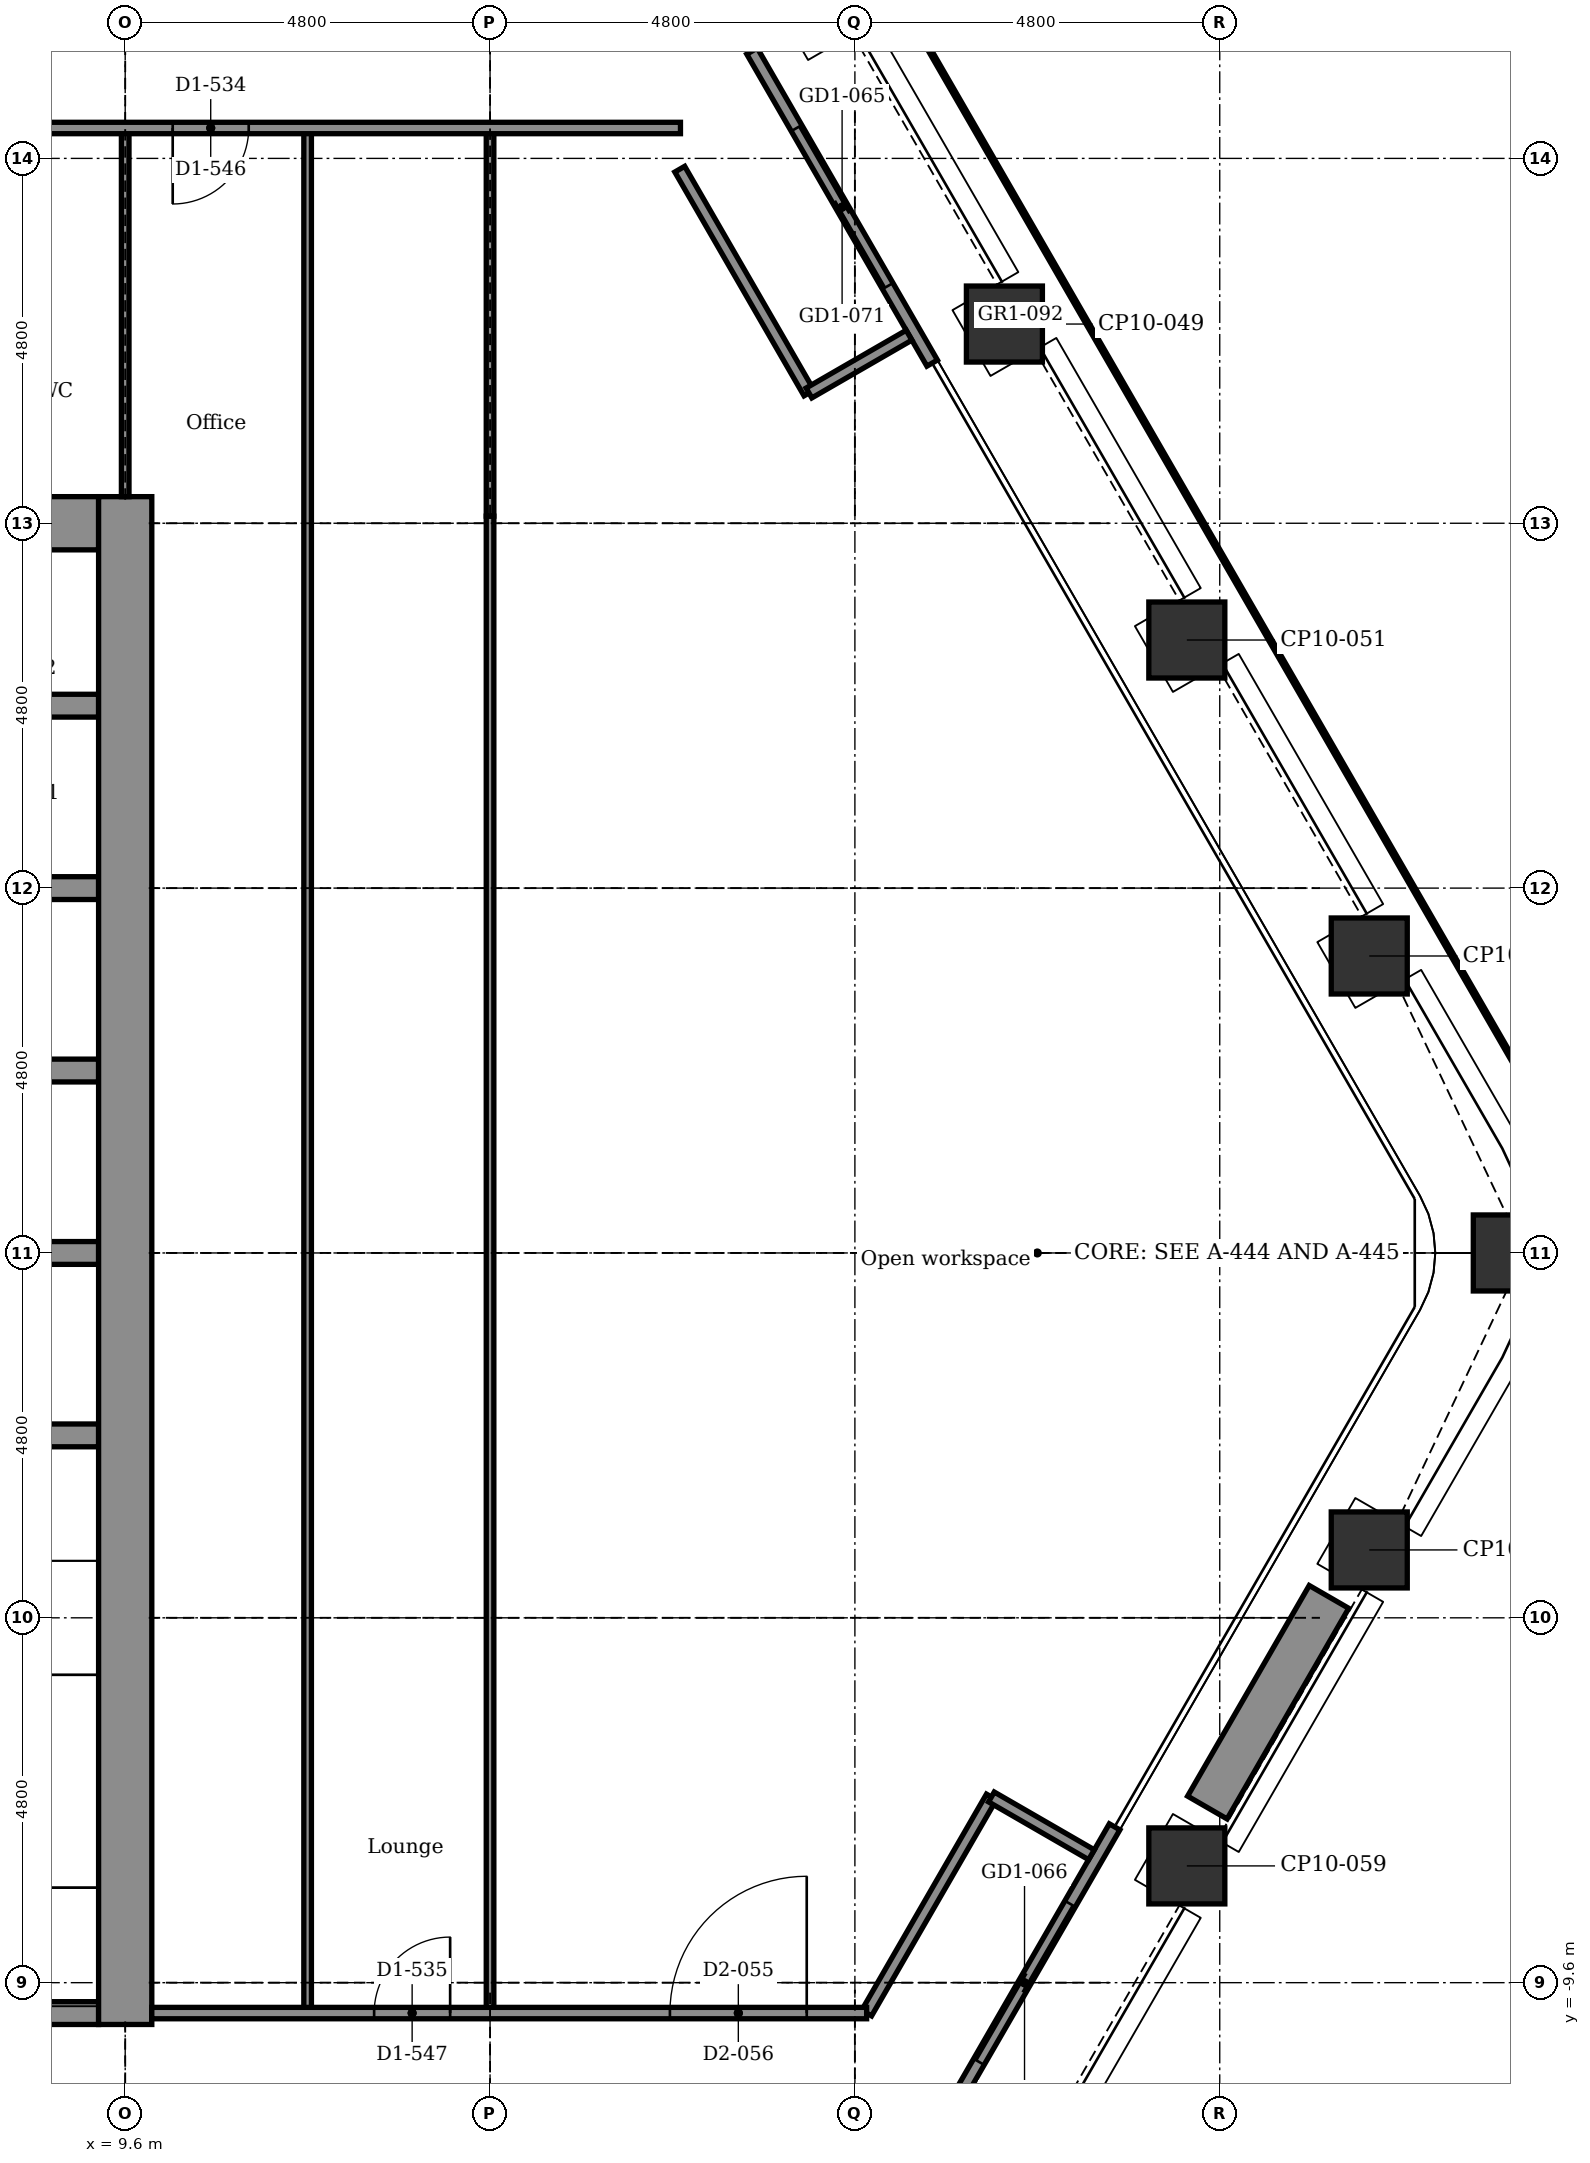
"""IFC4 building model, lengths in metres.
Left out: names, types, materials, properties, quantities, classifications, styles, units other than length and angle.
Written with IfcOpenShell. Run it as: python <this file> out.ifc"""

import sys

from ifc_helpers import new_model, si_unit, direction, frame, frame_2d, origin, origin_2d, place, context, subcontext, project, spatial, rectangle, extrude, element, fill, save


model = new_model("IFC4")
c1 = context("Model", 3, precision=1e-05, world=origin(), true_north=direction((0.0, 1.0)))
c2 = subcontext(c1, "Body", "Model", "MODEL_VIEW")
j1 = project(units=[si_unit("LENGTHUNIT", "METRE"), si_unit("PLANEANGLEUNIT", "RADIAN")], contexts=[c1])
p1 = place(None, origin())
s1 = spatial("IfcSite", under=j1, at=p1, CompositionType="ELEMENT")
p2 = place(p1, origin())
s2 = spatial("IfcBuilding", under=s1, at=p2, CompositionType="ELEMENT")
p3 = place(p2, frame((0.0, 0.0, 185.6)))
s3 = spatial("IfcBuildingStorey", under=s2, at=p3, CompositionType="ELEMENT", Elevation=185.6)
for number, where, z_axis, x_axis in (
    (1, (18.767, 16.378, -0.15), (0.0, 0.0, 1.0), (0.866, 0.5, 0.0)),
    (2, (21.167, 12.221, -0.15), (0.0, 0.0, 1.0), (0.866, 0.5, 0.0)),
    (3, (23.567, 8.064, -0.15), (0.0, 0.0, 1.0), (0.866, 0.5, 0.0)),
    (4, (25.967, 3.907, -0.15), (0.0, 0.0, 1.0), (0.866, 0.5, 0.0)),
    (5, (27.836, 0.0, -0.15), (0.0, 0.0, 1.0), (1.0, 0.0, 0.0)),
    (6, (25.967, -3.907, -0.15), (0.0, 0.0, 1.0), (0.5, 0.866, 0.0)),
    (7, (23.567, -8.064, -0.15), (0.0, 0.0, 1.0), (0.5, 0.866, 0.0)),
):
    element("IfcColumn", number, at=place(p3, frame(where, z_axis=z_axis, x_axis=x_axis)), inside=s3, PredefinedType="COLUMN", context=c2, shape_type="SweptSolid", body=[
        extrude(rectangle(XDim=1.0, YDim=1.0, at=origin_2d()), origin(), (0.0, 0.0, 1.0), 3.9),
    ])
p4 = place(p3, frame((4.95, -10.0, -0.15), z_axis=(0.0, 0.0, 1.0), x_axis=(1.0, 0.0, 0.0)))
e8 = element("IfcWall", 8, at=p4, inside=s3, PredefinedType="STANDARD", context=c2, shape_type="SweptSolid", body=[
    extrude(rectangle(XDim=4.3, YDim=0.3, at=frame_2d((2.15, 0.0))), origin(), (0.0, 0.0, 1.0), 3.9),
])
for number, where, z_axis, x_axis in (
    (9, (6.15, -2.4, -0.15), (0.0, 0.0, 1.0), (1.0, 0.0, 0.0)),
    (10, (6.15, 0.0, -0.15), (0.0, 0.0, 1.0), (1.0, 0.0, 0.0)),
    (11, (6.15, 2.4, -0.15), (0.0, 0.0, 1.0), (1.0, 0.0, 0.0)),
    (12, (6.15, 4.8, -0.15), (0.0, 0.0, 1.0), (1.0, 0.0, 0.0)),
):
    element("IfcWall", number, at=place(p3, frame(where, z_axis=z_axis, x_axis=x_axis)), inside=s3, PredefinedType="STANDARD", context=c2, shape_type="SweptSolid", body=[
        extrude(rectangle(XDim=3.1, YDim=0.3, at=frame_2d((1.55, 0.0))), origin(), (0.0, 0.0, 1.0), 3.9),
    ])
p5 = place(p3, frame((6.0, 7.2, -0.15), z_axis=(0.0, 0.0, 1.0), x_axis=(1.0, 0.0, 0.0)))
e13 = element("IfcWall", 13, at=p5, inside=s3, PredefinedType="STANDARD", context=c2, shape_type="SweptSolid", body=[
    extrude(rectangle(XDim=3.25, YDim=0.3, at=frame_2d((1.625, 0.0))), origin(), (0.0, 0.0, 1.0), 3.9),
])
p6 = place(p3, frame((-5.25, 9.6, -0.15), z_axis=(0.0, 0.0, 1.0), x_axis=(1.0, 0.0, 0.0)))
e14 = element("IfcWall", 14, at=p6, inside=s3, PredefinedType="SHEAR", context=c2, shape_type="SweptSolid", body=[
    extrude(rectangle(XDim=14.5, YDim=0.7, at=frame_2d((7.25, 0.0))), origin(), (0.0, 0.0, 1.0), 3.9),
])
p7 = place(p6, frame((9.35, 0.0, 0.15)))
e15 = element("IfcOpeningElement", 15, at=p7, cuts=e14, PredefinedType="OPENING", context=c2, shape_type="SweptSolid", body=[
    extrude(rectangle(XDim=1.4, YDim=2.1, at=frame_2d((0.7, 1.05))), frame((0.0, 0.36, 0.0), z_axis=(0.0, -1.0, 0.0), x_axis=(1.0, 0.0, 0.0)), (0.0, 0.0, 1.0), 0.72),
])
p8 = place(p3, frame((9.6, -10.15, -0.15), z_axis=(0.0, 0.0, 1.0), x_axis=(0.0, 1.0, 0.0)))
e16 = element("IfcWall", 16, at=p8, inside=s3, PredefinedType="SHEAR", context=c2, shape_type="SweptSolid", body=[
    extrude(rectangle(XDim=20.1, YDim=0.7, at=frame_2d((10.05, 0.0))), origin(), (0.0, 0.0, 1.0), 3.9),
])
p9 = place(p3, frame((17.847, 15.812, 0.0), z_axis=(0.0, 0.0, 1.0), x_axis=(0.5000167099, -0.866015756104, 0.0)))
e17 = element("IfcWall", 17, at=p9, inside=s3, PredefinedType="PARTITIONING", context=c2, shape_type="SweptSolid", body=[
    extrude(rectangle(XDim=4.74, YDim=0.16, at=frame_2d((2.37, 0.0))), origin(), (0.0, 0.0, 1.0), 3.75),
])
p10 = place(p9, frame((1.17, 0.0, 0.0)))
e18 = element("IfcOpeningElement", 18, at=p10, cuts=e17, PredefinedType="OPENING", context=c2, shape_type="SweptSolid", body=[
    extrude(rectangle(XDim=2.4, YDim=2.4, at=frame_2d((1.2, 1.2))), frame((0.0, 0.09, 0.0), z_axis=(0.0, -1.0, 0.0), x_axis=(1.0, 0.0, 0.0)), (0.0, 0.0, 1.0), 0.18),
])
p11 = place(p3, frame((22.617, -7.55, 0.0), z_axis=(0.0, 0.0, 1.0), x_axis=(-0.5000167099, -0.866015756104, 0.0)))
e19 = element("IfcWall", 19, at=p11, inside=s3, PredefinedType="PARTITIONING", context=c2, shape_type="SweptSolid", body=[
    extrude(rectangle(XDim=4.74, YDim=0.16, at=frame_2d((2.37, 0.0))), origin(), (0.0, 0.0, 1.0), 3.75),
])
p12 = place(p11, frame((1.17, 0.0, 0.0)))
e20 = element("IfcOpeningElement", 20, at=p12, cuts=e19, PredefinedType="OPENING", context=c2, shape_type="SweptSolid", body=[
    extrude(rectangle(XDim=2.4, YDim=2.4, at=frame_2d((1.2, 1.2))), frame((0.0, 0.09, 0.0), z_axis=(0.0, -1.0, 0.0), x_axis=(1.0, 0.0, 0.0)), (0.0, 0.0, 1.0), 0.18),
])
p13 = place(p3, frame((25.437, -4.525, 0.0), z_axis=(0.0, 0.0, 1.0), x_axis=(-0.499938187974, -0.866061088033, 0.0)))
e21 = element("IfcWall", 21, at=p13, inside=s3, PredefinedType="USERDEFINED", context=c2, shape_type="SweptSolid", body=[
    extrude(rectangle(XDim=3.2, YDim=0.6, at=frame_2d((1.6, 0.0))), origin(), (0.0, 0.0, 1.0), 0.7),
])
p14 = place(p3, frame((14.4, -10.0, 0.0), z_axis=(0.0, 0.0, 1.0), x_axis=(0.0, 1.0, 0.0)))
e22 = element("IfcWall", 22, at=p14, inside=s3, PredefinedType="PARTITIONING", context=c2, shape_type="SweptSolid", body=[
    extrude(rectangle(XDim=19.694, YDim=0.1, at=frame_2d((9.847, 0.0))), origin(), (0.0, 0.0, 1.0), 3.75),
])
p15 = place(p3, frame((14.4, 9.694, 0.0), z_axis=(0.0, 0.0, 1.0), x_axis=(0.0, 1.0, 0.0)))
e23 = element("IfcWall", 23, at=p15, inside=s3, PredefinedType="PARTITIONING", context=c2, shape_type="SweptSolid", body=[
    extrude(rectangle(XDim=5.106, YDim=0.1, at=frame_2d((2.553, 0.0))), origin(), (0.0, 0.0, 1.0), 3.066),
])
p16 = place(p3, frame((12.0, -10.0, 0.0), z_axis=(0.0, 0.0, 1.0), x_axis=(0.0, 1.0, 0.0)))
e24 = element("IfcWall", 24, at=p16, inside=s3, PredefinedType="PARTITIONING", context=c2, shape_type="SweptSolid", body=[
    extrude(rectangle(XDim=24.8, YDim=0.1, at=frame_2d((12.4, 0.0))), origin(), (0.0, 0.0, 1.0), 3.75),
])
p17 = place(p3, frame((9.6, 9.95, 0.0), z_axis=(0.0, 0.0, 1.0), x_axis=(0.0, 1.0, 0.0)))
e25 = element("IfcWall", 25, at=p17, inside=s3, PredefinedType="PARTITIONING", context=c2, shape_type="SweptSolid", body=[
    extrude(rectangle(XDim=4.85, YDim=0.1, at=frame_2d((2.425, 0.0))), origin(), (0.0, 0.0, 1.0), 3.066),
])
p18 = place(p3, frame((16.896, 14.258, 0.0), z_axis=(0.0, 0.0, 1.0), x_axis=(0.499977295307, -0.866038511948, 0.0)))
e26 = element("IfcWall", 26, at=p18, inside=s3, PredefinedType="PARTITIONING", context=c2, shape_type="SweptSolid", body=[
    extrude(rectangle(XDim=3.4, YDim=0.15, at=frame_2d((1.7, 0.0))), origin(), (0.0, 0.0, 1.0), 3.75),
])
p19 = place(p3, frame((19.354, -10.0, 0.0), z_axis=(0.0, 0.0, 1.0), x_axis=(0.500009969958, 0.86601964755, 0.0)))
e27 = element("IfcWall", 27, at=p19, inside=s3, PredefinedType="PARTITIONING", context=c2, shape_type="SweptSolid", body=[
    extrude(rectangle(XDim=3.283, YDim=0.15, at=frame_2d((1.642, 0.0))), origin(), (0.0, 0.0, 1.0), 3.75),
])
p20 = place(p3, frame((20.996, -7.157, 0.0), z_axis=(0.0, 0.0, 1.0), x_axis=(0.865960906633, -0.500111695708, 0.0)))
e28 = element("IfcWall", 28, at=p20, inside=s3, PredefinedType="PARTITIONING", context=c2, shape_type="SweptSolid", body=[
    extrude(rectangle(XDim=1.52, YDim=0.15, at=frame_2d((0.76, 0.0))), origin(), (0.0, 0.0, 1.0), 3.75),
])
p21 = place(p3, frame((18.596, 11.314, 0.0), z_axis=(0.0, 0.0, 1.0), x_axis=(0.866030456496, 0.499991248344, 0.0)))
e29 = element("IfcWall", 29, at=p21, inside=s3, PredefinedType="PARTITIONING", context=c2, shape_type="SweptSolid", body=[
    extrude(rectangle(XDim=1.52, YDim=0.15, at=frame_2d((0.76, 0.0))), origin(), (0.0, 0.0, 1.0), 3.75),
])
p22 = place(p3, frame((9.95, -10.0, 0.0), z_axis=(0.0, 0.0, 1.0), x_axis=(1.0, 0.0, 0.0)))
e30 = element("IfcWall", 30, at=p22, inside=s3, PredefinedType="PARTITIONING", context=c2, shape_type="SweptSolid", body=[
    extrude(rectangle(XDim=9.405, YDim=0.15, at=frame_2d((4.702, 0.0))), origin(), (0.0, 0.0, 1.0), 3.75),
])
p23 = place(p22, frame((2.925, 0.0, 0.0)))
e31 = element("IfcOpeningElement", 31, at=p23, cuts=e30, PredefinedType="OPENING", context=c2, shape_type="SweptSolid", body=[
    extrude(rectangle(XDim=1.0, YDim=2.1, at=frame_2d((0.5, 1.05))), frame((0.0, 0.085, 0.0), z_axis=(0.0, -1.0, 0.0), x_axis=(1.0, 0.0, 0.0)), (0.0, 0.0, 1.0), 0.17),
])
p24 = place(p22, frame((6.816, 0.0, 0.0)))
e32 = element("IfcOpeningElement", 32, at=p24, cuts=e30, PredefinedType="OPENING", context=c2, shape_type="SweptSolid", body=[
    extrude(rectangle(XDim=1.8, YDim=2.1, at=frame_2d((0.9, 1.05))), frame((0.0, 0.085, 0.0), z_axis=(0.0, -1.0, 0.0), x_axis=(1.0, 0.0, 0.0)), (0.0, 0.0, 1.0), 0.17),
])
p25 = place(p3, frame((6.0, 14.8, 0.0), z_axis=(0.0, 0.0, 1.0), x_axis=(1.0, 0.0, 0.0)))
e33 = element("IfcWall", 33, at=p25, inside=s3, PredefinedType="PARTITIONING", context=c2, shape_type="SweptSolid", body=[
    extrude(rectangle(XDim=10.905, YDim=0.15, at=frame_2d((5.453, 0.0))), origin(), (0.0, 0.0, 1.0), 3.75),
])
p26 = place(p25, frame((4.225, 0.0, 0.0)))
e34 = element("IfcOpeningElement", 34, at=p26, cuts=e33, PredefinedType="OPENING", context=c2, shape_type="SweptSolid", body=[
    extrude(rectangle(XDim=1.0, YDim=2.1, at=frame_2d((0.5, 1.05))), frame((0.0, 0.085, 0.0), z_axis=(0.0, -1.0, 0.0), x_axis=(1.0, 0.0, 0.0)), (0.0, 0.0, 1.0), 0.17),
])
p27 = place(p10, origin())
e35 = element("IfcDoor", 35, at=p27, inside=s3, OperationType="DOUBLE_DOOR_SLIDING", PredefinedType="DOOR", context=c2, shape_type="SweptSolid", body=[
    extrude(rectangle(XDim=2.4, YDim=2.4, at=frame_2d((1.2, 1.2))), frame((0.0, 0.025, 0.0), z_axis=(0.0, -1.0, 0.0), x_axis=(1.0, 0.0, 0.0)), (0.0, 0.0, 1.0), 0.05),
])
fill(e18, e35)
p28 = place(p12, origin())
e36 = element("IfcDoor", 36, at=p28, inside=s3, OperationType="DOUBLE_DOOR_SLIDING", PredefinedType="DOOR", context=c2, shape_type="SweptSolid", body=[
    extrude(rectangle(XDim=2.4, YDim=2.4, at=frame_2d((1.2, 1.2))), frame((0.0, 0.025, 0.0), z_axis=(0.0, -1.0, 0.0), x_axis=(1.0, 0.0, 0.0)), (0.0, 0.0, 1.0), 0.05),
])
fill(e20, e36)
p29 = place(p26, frame((1.0, 0.0, 0.0), z_axis=(0.0, 0.0, 1.0), x_axis=(-1.0, 0.0, 0.0)))
e37 = element("IfcDoor", 37, at=p29, inside=s3, OperationType="SINGLE_SWING_LEFT", PredefinedType="DOOR", context=c2, shape_type="SweptSolid", body=[
    extrude(rectangle(XDim=1.0, YDim=2.1, at=frame_2d((0.5, 1.05))), frame((0.0, 0.025, 0.0), z_axis=(0.0, -1.0, 0.0), x_axis=(1.0, 0.0, 0.0)), (0.0, 0.0, 1.0), 0.05),
])
fill(e34, e37)
p30 = place(p23, origin())
e38 = element("IfcDoor", 38, at=p30, inside=s3, OperationType="SINGLE_SWING_RIGHT", PredefinedType="DOOR", context=c2, shape_type="SweptSolid", body=[
    extrude(rectangle(XDim=1.0, YDim=2.1, at=frame_2d((0.5, 1.05))), frame((0.0, 0.025, 0.0), z_axis=(0.0, -1.0, 0.0), x_axis=(1.0, 0.0, 0.0)), (0.0, 0.0, 1.0), 0.05),
])
fill(e31, e38)
p31 = place(p24, origin())
e39 = element("IfcDoor", 39, at=p31, inside=s3, OperationType="SINGLE_SWING_RIGHT", PredefinedType="DOOR", context=c2, shape_type="SweptSolid", body=[
    extrude(rectangle(XDim=1.8, YDim=2.1, at=frame_2d((0.9, 1.05))), frame((0.0, 0.025, 0.0), z_axis=(0.0, -1.0, 0.0), x_axis=(1.0, 0.0, 0.0)), (0.0, 0.0, 1.0), 0.05),
])
fill(e32, e39)
save(model, sys.argv[1])
